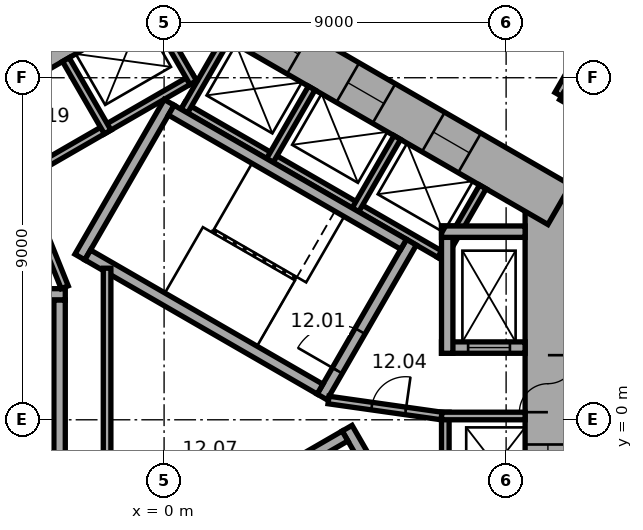
"""IFC4 building model, lengths in metres.
Left out: names, types, materials, properties, quantities, classifications, styles, units other than length and angle.
Written with IfcOpenShell. Run it as: python <this file> out.ifc"""

import sys

from ifc_helpers import new_model, si_unit, direction, frame, frame_2d, origin, place, context, subcontext, project, spatial, rectangle, extrude, element, fill, save


model = new_model("IFC4")
c1 = context("Model", 3, precision=1e-05, world=origin(), true_north=direction((0.0, 1.0)))
c2 = subcontext(c1, "Body", "Model", "MODEL_VIEW")
j1 = project(units=[si_unit("LENGTHUNIT", "METRE"), si_unit("PLANEANGLEUNIT", "RADIAN")], contexts=[c1])
p1 = place(None, origin())
s1 = spatial("IfcSite", under=j1, at=p1, CompositionType="ELEMENT")
p2 = place(p1, origin())
s2 = spatial("IfcBuilding", under=s1, at=p2, CompositionType="ELEMENT")
p3 = place(p2, frame((0.0, 0.0, 60.5)))
s3 = spatial("IfcBuildingStorey", under=s2, at=p3, CompositionType="ELEMENT", Elevation=60.5)
p4 = place(p3, frame((10.1, -6.177, 0.0), z_axis=(0.0, 0.0, 1.0), x_axis=(0.0, 1.0, 0.0)))
e1 = element("IfcWall", 1, at=p4, inside=s3, PredefinedType="SHEAR", context=c2, shape_type="SweptSolid", body=[
    extrude(rectangle(XDim=12.355, YDim=1.2, at=frame_2d((6.177, 0.0))), origin(), (0.0, 0.0, 1.0), 3.3),
])
p5 = place(p4, frame((6.378, 0.0, 0.0)))
e2 = element("IfcOpeningElement", 2, at=p5, cuts=e1, PredefinedType="OPENING", context=c2, shape_type="SweptSolid", body=[
    extrude(rectangle(XDim=1.5, YDim=2.1, at=frame_2d((0.75, 1.05))), frame((0.0, 0.61, 0.0), z_axis=(0.0, -1.0, 0.0), x_axis=(1.0, 0.0, 0.0)), (0.0, 0.0, 1.0), 1.22),
])
p6 = place(p4, frame((1.828, 0.0, 0.0)))
e3 = element("IfcOpeningElement", 3, at=p6, cuts=e1, PredefinedType="OPENING", context=c2, shape_type="SweptSolid", body=[
    extrude(rectangle(XDim=1.1, YDim=2.1, at=frame_2d((0.55, 1.05))), frame((0.0, 0.61, 0.0), z_axis=(0.0, -1.0, 0.0), x_axis=(1.0, 0.0, 0.0)), (0.0, 0.0, 1.0), 1.22),
])
p7 = place(p4, frame((4.427, 0.0, 0.0)))
e4 = element("IfcOpeningElement", 4, at=p7, cuts=e1, PredefinedType="OPENING", context=c2, shape_type="SweptSolid", body=[
    extrude(rectangle(XDim=1.1, YDim=2.1, at=frame_2d((0.55, 1.05))), frame((0.0, 0.61, 0.0), z_axis=(0.0, -1.0, 0.0), x_axis=(1.0, 0.0, 0.0)), (0.0, 0.0, 1.0), 1.22),
])
p8 = place(p3, frame((10.4, 5.658, 0.0), z_axis=(0.0, 0.0, 1.0), x_axis=(-0.866021384402, 0.500006961711, 0.0)))
e5 = element("IfcWall", 5, at=p8, inside=s3, PredefinedType="SHEAR", context=c2, shape_type="SweptSolid", body=[
    extrude(rectangle(XDim=12.355, YDim=1.2, at=frame_2d((6.178, 0.0))), origin(), (0.0, 0.0, 1.0), 3.3),
])
p9 = place(p8, frame((2.728, 0.0, 0.0)))
e6 = element("IfcOpeningElement", 6, at=p9, cuts=e5, PredefinedType="OPENING", context=c2, shape_type="SweptSolid", body=[
    extrude(rectangle(XDim=1.1, YDim=2.1, at=frame_2d((0.55, 1.05))), frame((0.0, 0.61, 0.0), z_axis=(0.0, -1.0, 0.0), x_axis=(1.0, 0.0, 0.0)), (0.0, 0.0, 1.0), 1.22),
])
p10 = place(p8, frame((5.328, 0.0, 0.0)))
e7 = element("IfcOpeningElement", 7, at=p10, cuts=e5, PredefinedType="OPENING", context=c2, shape_type="SweptSolid", body=[
    extrude(rectangle(XDim=1.1, YDim=2.1, at=frame_2d((0.55, 1.05))), frame((0.0, 0.61, 0.0), z_axis=(0.0, -1.0, 0.0), x_axis=(1.0, 0.0, 0.0)), (0.0, 0.0, 1.0), 1.22),
])
p11 = place(p8, frame((7.928, 0.0, 0.0)))
e8 = element("IfcOpeningElement", 8, at=p11, cuts=e5, PredefinedType="OPENING", context=c2, shape_type="SweptSolid", body=[
    extrude(rectangle(XDim=1.1, YDim=2.1, at=frame_2d((0.55, 1.05))), frame((0.0, 0.61, 0.0), z_axis=(0.0, -1.0, 0.0), x_axis=(1.0, 0.0, 0.0)), (0.0, 0.0, 1.0), 1.22),
])
p12 = place(p3, frame((0.3, 11.836, 0.0), z_axis=(0.0, 0.0, 1.0), x_axis=(-0.866021384402, -0.500006961711, 0.0)))
e9 = element("IfcWall", 9, at=p12, inside=s3, PredefinedType="SHEAR", context=c2, shape_type="SweptSolid", body=[
    extrude(rectangle(XDim=12.355, YDim=1.2, at=frame_2d((6.178, 0.0))), origin(), (0.0, 0.0, 1.0), 3.3),
])
p13 = place(p12, frame((6.378, 0.0, 0.0)))
e10 = element("IfcOpeningElement", 10, at=p13, cuts=e9, PredefinedType="OPENING", context=c2, shape_type="SweptSolid", body=[
    extrude(rectangle(XDim=1.5, YDim=2.1, at=frame_2d((0.75, 1.05))), frame((0.0, 0.61, 0.0), z_axis=(0.0, -1.0, 0.0), x_axis=(1.0, 0.0, 0.0)), (0.0, 0.0, 1.0), 1.22),
])
p14 = place(p12, frame((1.828, 0.0, 0.0)))
e11 = element("IfcOpeningElement", 11, at=p14, cuts=e9, PredefinedType="OPENING", context=c2, shape_type="SweptSolid", body=[
    extrude(rectangle(XDim=1.1, YDim=2.1, at=frame_2d((0.55, 1.05))), frame((0.0, 0.61, 0.0), z_axis=(0.0, -1.0, 0.0), x_axis=(1.0, 0.0, 0.0)), (0.0, 0.0, 1.0), 1.22),
])
p15 = place(p3, frame((7.4, -5.2, 0.0), z_axis=(0.0, 0.0, 1.0), x_axis=(0.0, 1.0, 0.0)))
e12 = element("IfcWall", 12, at=p15, inside=s3, PredefinedType="PARTITIONING", context=c2, shape_type="SweptSolid", body=[
    extrude(rectangle(XDim=5.4, YDim=0.2, at=frame_2d((2.7, 0.0))), origin(), (0.0, 0.0, 1.0), 3.05),
])
p16 = place(p3, frame((7.3, 0.1, 0.0), z_axis=(0.0, 0.0, 1.0), x_axis=(1.0, 0.0, 0.0)))
e13 = element("IfcWall", 13, at=p16, inside=s3, PredefinedType="PARTITIONING", context=c2, shape_type="SweptSolid", body=[
    extrude(rectangle(XDim=2.2, YDim=0.2, at=frame_2d((1.1, 0.0))), origin(), (0.0, 0.0, 1.0), 3.05),
])
p17 = place(p3, frame((7.424, 4.259, 0.0), z_axis=(0.0, 0.0, 1.0), x_axis=(-0.866026010844, 0.49999894854, 0.0)))
e14 = element("IfcWall", 14, at=p17, inside=s3, PredefinedType="PARTITIONING", context=c2, shape_type="SweptSolid", body=[
    extrude(rectangle(XDim=8.0, YDim=0.2, at=frame_2d((4.0, 0.0))), origin(), (0.0, 0.0, 1.0), 3.05),
])
for number, where, z_axis, x_axis in (
    (15, (7.287, 4.222, 0.0), (0.0, 0.0, 1.0), (0.5, 0.866, 0.0)),
    (16, (5.036, 5.522, 0.0), (0.0, 0.0, 1.0), (0.5, 0.866, 0.0)),
    (17, (2.784, 6.822, 0.0), (0.0, 0.0, 1.0), (0.5, 0.866, 0.0)),
    (18, (0.532, 8.122, 0.0), (0.0, 0.0, 1.0), (0.5, 0.866, 0.0)),
):
    element("IfcWall", number, at=place(p3, frame(where, z_axis=z_axis, x_axis=x_axis)), inside=s3, PredefinedType="PARTITIONING", context=c2, shape_type="SweptSolid", body=[
        extrude(rectangle(XDim=2.2, YDim=0.2, at=frame_2d((1.1, 0.0))), origin(), (0.0, 0.0, 1.0), 3.05),
    ])
p18 = place(p3, frame((0.803, 9.009, 0.0), z_axis=(0.0, 0.0, 1.0), x_axis=(-0.866028230842, -0.499995103361, 0.0)))
e19 = element("IfcWall", 19, at=p18, inside=s3, PredefinedType="PARTITIONING", context=c2, shape_type="SweptSolid", body=[
    extrude(rectangle(XDim=5.4, YDim=0.2, at=frame_2d((2.7, 0.0))), origin(), (0.0, 0.0, 1.0), 3.05),
])
p19 = place(p3, frame((0.767, 8.872, 0.0), z_axis=(0.0, 0.0, 1.0), x_axis=(-0.499994660107, 0.866028486751, 0.0)))
e20 = element("IfcWall", 20, at=p19, inside=s3, PredefinedType="PARTITIONING", context=c2, shape_type="SweptSolid", body=[
    extrude(rectangle(XDim=2.2, YDim=0.2, at=frame_2d((1.1, 0.0))), origin(), (0.0, 0.0, 1.0), 3.05),
])
p20 = place(p3, frame((-1.485, 7.572, 0.0), z_axis=(0.0, 0.0, 1.0), x_axis=(-0.50002983664, 0.866008176907, 0.0)))
e21 = element("IfcWall", 21, at=p20, inside=s3, PredefinedType="PARTITIONING", context=c2, shape_type="SweptSolid", body=[
    extrude(rectangle(XDim=2.2, YDim=0.2, at=frame_2d((1.1, 0.0))), origin(), (0.0, 0.0, 1.0), 3.05),
])
p21 = place(p3, frame((4.158, 0.602, 0.0), z_axis=(0.0, 0.0, 1.0), x_axis=(0.499977259774, 0.866038532462, 0.0)))
e22 = element("IfcWall", 22, at=p21, inside=s3, PredefinedType="SHEAR", context=c2, shape_type="SweptSolid", body=[
    extrude(rectangle(XDim=4.7, YDim=0.3, at=frame_2d((2.35, 0.0))), origin(), (0.0, 0.0, 1.0), 3.05),
])
p22 = place(p21, frame((0.8, 0.0, 0.0)))
e23 = element("IfcOpeningElement", 23, at=p22, cuts=e22, PredefinedType="OPENING", context=c2, shape_type="SweptSolid", body=[
    extrude(rectangle(XDim=1.2, YDim=2.1, at=frame_2d((0.6, 1.05))), frame((0.0, 0.16, 0.0), z_axis=(0.0, -1.0, 0.0), x_axis=(1.0, 0.0, 0.0)), (0.0, 0.0, 1.0), 0.32),
])
p23 = place(p3, frame((-2.216, 4.282, 0.0), z_axis=(0.0, 0.0, 1.0), x_axis=(0.499977259774, 0.866038532462, 0.0)))
e24 = element("IfcWall", 24, at=p23, inside=s3, PredefinedType="SHEAR", context=c2, shape_type="SweptSolid", body=[
    extrude(rectangle(XDim=4.7, YDim=0.3, at=frame_2d((2.35, 0.0))), origin(), (0.0, 0.0, 1.0), 3.05),
])
for number, where, z_axis, x_axis in (
    (25, (4.103, 0.807, 0.0), (0.0, 0.0, 1.0), (-0.866, 0.5, 0.0)),
    (26, (6.303, 4.617, 0.0), (0.0, 0.0, 1.0), (-0.866, 0.5, 0.0)),
):
    element("IfcWall", number, at=place(p3, frame(where, z_axis=z_axis, x_axis=x_axis)), inside=s3, PredefinedType="SHEAR", context=c2, shape_type="SweptSolid", body=[
        extrude(rectangle(XDim=7.06, YDim=0.3, at=frame_2d((3.53, 0.0))), origin(), (0.0, 0.0, 1.0), 3.05),
    ])
p24 = place(p3, frame((-2.6, 3.3, 0.0), z_axis=(0.0, 0.0, 1.0), x_axis=(-1.0, 0.0, 0.0)))
e27 = element("IfcWall", 27, at=p24, inside=s3, PredefinedType="SHEAR", context=c2, shape_type="SweptSolid", body=[
    extrude(rectangle(XDim=4.7, YDim=0.3, at=frame_2d((2.35, 0.0))), origin(), (0.0, 0.0, 1.0), 3.05),
])
p25 = place(p24, frame((0.8, 0.0, 0.0)))
e28 = element("IfcOpeningElement", 28, at=p25, cuts=e27, PredefinedType="OPENING", context=c2, shape_type="SweptSolid", body=[
    extrude(rectangle(XDim=1.2, YDim=2.1, at=frame_2d((0.6, 1.05))), frame((0.0, 0.16, 0.0), z_axis=(0.0, -1.0, 0.0), x_axis=(1.0, 0.0, 0.0)), (0.0, 0.0, 1.0), 0.32),
])
p26 = place(p3, frame((-2.75, 3.15, 0.0), z_axis=(0.0, 0.0, 1.0), x_axis=(0.0, -1.0, 0.0)))
e29 = element("IfcWall", 29, at=p26, inside=s3, PredefinedType="SHEAR", context=c2, shape_type="SweptSolid", body=[
    extrude(rectangle(XDim=7.06, YDim=0.3, at=frame_2d((3.53, 0.0))), origin(), (0.0, 0.0, 1.0), 3.05),
])
p27 = place(p3, frame((4.816, -0.222, 0.0), z_axis=(0.0, 0.0, 1.0), x_axis=(0.499977259774, -0.866038532462, 0.0)))
e30 = element("IfcWall", 30, at=p27, inside=s3, PredefinedType="SHEAR", context=c2, shape_type="SweptSolid", body=[
    extrude(rectangle(XDim=4.7, YDim=0.3, at=frame_2d((2.35, 0.0))), origin(), (0.0, 0.0, 1.0), 3.05),
])
p28 = place(p3, frame((-1.353, -3.957, 0.0), z_axis=(0.0, 0.0, 1.0), x_axis=(0.866027801685, 0.499995846692, 0.0)))
e31 = element("IfcWall", 31, at=p28, inside=s3, PredefinedType="SHEAR", context=c2, shape_type="SweptSolid", body=[
    extrude(rectangle(XDim=7.06, YDim=0.3, at=frame_2d((3.53, 0.0))), origin(), (0.0, 0.0, 1.0), 3.05),
])
p29 = place(p3, frame((7.3, 1.9, 0.0), z_axis=(0.0, 0.0, 1.0), x_axis=(1.0, 0.0, 0.0)))
e32 = element("IfcWall", 32, at=p29, inside=s3, PredefinedType="SHEAR", context=c2, shape_type="SweptSolid", body=[
    extrude(rectangle(XDim=2.2, YDim=0.3, at=frame_2d((1.1, 0.0))), origin(), (0.0, 0.0, 1.0), 3.05),
])
p30 = place(p29, frame((0.7, 0.0, 0.0)))
e33 = element("IfcOpeningElement", 33, at=p30, cuts=e32, PredefinedType="OPENING", context=c2, shape_type="SweptSolid", body=[
    extrude(rectangle(XDim=1.1, YDim=2.1, at=frame_2d((0.55, 1.05))), frame((0.0, 0.16, 0.0), z_axis=(0.0, -1.0, 0.0), x_axis=(1.0, 0.0, 0.0)), (0.0, 0.0, 1.0), 0.32),
])
p31 = place(p3, frame((7.45, 1.75, 0.0), z_axis=(0.0, 0.0, 1.0), x_axis=(0.0, 1.0, 0.0)))
e34 = element("IfcWall", 34, at=p31, inside=s3, PredefinedType="SHEAR", context=c2, shape_type="SweptSolid", body=[
    extrude(rectangle(XDim=3.35, YDim=0.3, at=frame_2d((1.675, 0.0))), origin(), (0.0, 0.0, 1.0), 3.05),
])
p32 = place(p3, frame((7.3, 4.95, 0.0), z_axis=(0.0, 0.0, 1.0), x_axis=(1.0, 0.0, 0.0)))
e35 = element("IfcWall", 35, at=p32, inside=s3, PredefinedType="SHEAR", context=c2, shape_type="SweptSolid", body=[
    extrude(rectangle(XDim=2.2, YDim=0.3, at=frame_2d((1.1, 0.0))), origin(), (0.0, 0.0, 1.0), 3.05),
])
p33 = place(p3, frame((4.327, 0.521, 0.0), z_axis=(0.0, 0.0, 1.0), x_axis=(0.990124376366, -0.14019172346, 0.0)))
e36 = element("IfcWall", 36, at=p33, inside=s3, PredefinedType="PARTITIONING", context=c2, shape_type="SweptSolid", body=[
    extrude(rectangle(XDim=3.002, YDim=0.2, at=frame_2d((1.501, 0.0))), origin(), (0.0, 0.0, 1.0), 3.05),
])
p34 = place(p33, frame((1.15, 0.0, 0.0)))
e37 = element("IfcOpeningElement", 37, at=p34, cuts=e36, PredefinedType="OPENING", context=c2, shape_type="SweptSolid", body=[
    extrude(rectangle(XDim=0.9, YDim=2.1, at=frame_2d((0.45, 1.05))), frame((0.0, 0.11, 0.0), z_axis=(0.0, -1.0, 0.0), x_axis=(1.0, 0.0, 0.0)), (0.0, 0.0, 1.0), 0.22),
])
p35 = place(p3, frame((-2.615, 3.487, 0.0), z_axis=(0.0, 0.0, 1.0), x_axis=(-0.373576831041, 0.92759924068, 0.0)))
e38 = element("IfcWall", 38, at=p35, inside=s3, PredefinedType="PARTITIONING", context=c2, shape_type="SweptSolid", body=[
    extrude(rectangle(XDim=3.002, YDim=0.2, at=frame_2d((1.501, 0.0))), origin(), (0.0, 0.0, 1.0), 3.05),
])
p36 = place(p3, frame((-1.5, -3.988, 0.0), z_axis=(0.0, 0.0, 1.0), x_axis=(0.0, 1.0, 0.0)))
e39 = element("IfcWall", 39, at=p36, inside=s3, PredefinedType="PARTITIONING", context=c2, shape_type="SweptSolid", body=[
    extrude(rectangle(XDim=7.977, YDim=0.2, at=frame_2d((3.988, 0.0))), origin(), (0.0, 0.0, 1.0), 3.05),
])
p37 = place(p3, frame((10.371, 8.561, 0.0), z_axis=(0.0, 0.0, 1.0), x_axis=(0.50004290449, 0.866000631449, 0.0)))
e40 = element("IfcWall", 40, at=p37, inside=s3, PredefinedType="PARTITIONING", context=c2, shape_type="SweptSolid", body=[
    extrude(rectangle(XDim=0.901, YDim=0.2, at=frame_2d((0.451, 0.0))), origin(), (0.0, 0.0, 1.0), 3.05),
])
p38 = place(p3, frame((10.972, 9.602, 0.0), z_axis=(0.0, 0.0, 1.0), x_axis=(-0.866033277307, 0.499986362411, 0.0)))
e41 = element("IfcWall", 41, at=p38, inside=s3, PredefinedType="PARTITIONING", context=c2, shape_type="SweptSolid", body=[
    extrude(rectangle(XDim=8.702, YDim=0.2, at=frame_2d((4.351, 0.0))), origin(), (0.0, 0.0, 1.0), 3.05),
])
p39 = place(p38, frame((4.364, 0.0, 0.0)))
e42 = element("IfcOpeningElement", 42, at=p39, cuts=e41, PredefinedType="OPENING", context=c2, shape_type="SweptSolid", body=[
    extrude(rectangle(XDim=0.9, YDim=2.1, at=frame_2d((0.45, 1.05))), frame((0.0, 0.11, 0.0), z_axis=(0.0, -1.0, 0.0), x_axis=(1.0, 0.0, 0.0)), (0.0, 0.0, 1.0), 0.22),
])
p40 = place(p3, frame((11.566, 7.871, 0.0), z_axis=(0.0, 0.0, 1.0), x_axis=(-0.866004557827, 0.500036104519, 0.0)))
e43 = element("IfcWall", 43, at=p40, inside=s3, PredefinedType="PARTITIONING", context=c2, shape_type="SweptSolid", body=[
    extrude(rectangle(XDim=1.28, YDim=0.2, at=frame_2d((0.64, 0.0))), origin(), (0.0, 0.0, 1.0), 3.05),
])
p41 = place(p5, origin())
e44 = element("IfcDoor", 44, at=p41, inside=s3, OperationType="DOUBLE_DOOR_SINGLE_SWING", PredefinedType="DOOR", context=c2, shape_type="SweptSolid", body=[
    extrude(rectangle(XDim=1.5, YDim=2.1, at=frame_2d((0.75, 1.05))), frame((0.0, 0.025, 0.0), z_axis=(0.0, -1.0, 0.0), x_axis=(1.0, 0.0, 0.0)), (0.0, 0.0, 1.0), 0.05),
])
fill(e2, e44)
p42 = place(p22, origin())
e45 = element("IfcDoor", 45, at=p42, inside=s3, OperationType="SINGLE_SWING_RIGHT", PredefinedType="DOOR", context=c2, shape_type="SweptSolid", body=[
    extrude(rectangle(XDim=1.2, YDim=2.1, at=frame_2d((0.6, 1.05))), frame((0.0, 0.025, 0.0), z_axis=(0.0, -1.0, 0.0), x_axis=(1.0, 0.0, 0.0)), (0.0, 0.0, 1.0), 0.05),
])
fill(e23, e45)
p43 = place(p34, origin())
e46 = element("IfcDoor", 46, at=p43, inside=s3, OperationType="SINGLE_SWING_LEFT", PredefinedType="DOOR", context=c2, shape_type="SweptSolid", body=[
    extrude(rectangle(XDim=0.9, YDim=2.1, at=frame_2d((0.45, 1.05))), frame((0.0, 0.025, 0.0), z_axis=(0.0, -1.0, 0.0), x_axis=(1.0, 0.0, 0.0)), (0.0, 0.0, 1.0), 0.05),
])
fill(e37, e46)
p44 = place(p30, origin())
e47 = element("IfcDoor", 47, at=p44, inside=s3, OperationType="DOUBLE_DOOR_SLIDING", PredefinedType="DOOR", context=c2, shape_type="SweptSolid", body=[
    extrude(rectangle(XDim=1.1, YDim=2.1, at=frame_2d((0.55, 1.05))), frame((0.0, 0.025, 0.0), z_axis=(0.0, -1.0, 0.0), x_axis=(1.0, 0.0, 0.0)), (0.0, 0.0, 1.0), 0.05),
])
fill(e33, e47)
p45 = place(p7, origin())
e48 = element("IfcDoor", 48, at=p45, inside=s3, OperationType="DOUBLE_DOOR_SLIDING", PredefinedType="DOOR", context=c2, shape_type="SweptSolid", body=[
    extrude(rectangle(XDim=1.1, YDim=2.1, at=frame_2d((0.55, 1.05))), frame((0.0, 0.025, 0.0), z_axis=(0.0, -1.0, 0.0), x_axis=(1.0, 0.0, 0.0)), (0.0, 0.0, 1.0), 0.05),
])
fill(e4, e48)
p46 = place(p9, origin())
e49 = element("IfcDoor", 49, at=p46, inside=s3, OperationType="DOUBLE_DOOR_SLIDING", PredefinedType="DOOR", context=c2, shape_type="SweptSolid", body=[
    extrude(rectangle(XDim=1.1, YDim=2.1, at=frame_2d((0.55, 1.05))), frame((0.0, 0.025, 0.0), z_axis=(0.0, -1.0, 0.0), x_axis=(1.0, 0.0, 0.0)), (0.0, 0.0, 1.0), 0.05),
])
fill(e6, e49)
p47 = place(p10, origin())
e50 = element("IfcDoor", 50, at=p47, inside=s3, OperationType="DOUBLE_DOOR_SLIDING", PredefinedType="DOOR", context=c2, shape_type="SweptSolid", body=[
    extrude(rectangle(XDim=1.1, YDim=2.1, at=frame_2d((0.55, 1.05))), frame((0.0, 0.025, 0.0), z_axis=(0.0, -1.0, 0.0), x_axis=(1.0, 0.0, 0.0)), (0.0, 0.0, 1.0), 0.05),
])
fill(e7, e50)
p48 = place(p11, origin())
e51 = element("IfcDoor", 51, at=p48, inside=s3, OperationType="DOUBLE_DOOR_SLIDING", PredefinedType="DOOR", context=c2, shape_type="SweptSolid", body=[
    extrude(rectangle(XDim=1.1, YDim=2.1, at=frame_2d((0.55, 1.05))), frame((0.0, 0.025, 0.0), z_axis=(0.0, -1.0, 0.0), x_axis=(1.0, 0.0, 0.0)), (0.0, 0.0, 1.0), 0.05),
])
fill(e8, e51)
save(model, sys.argv[1])
